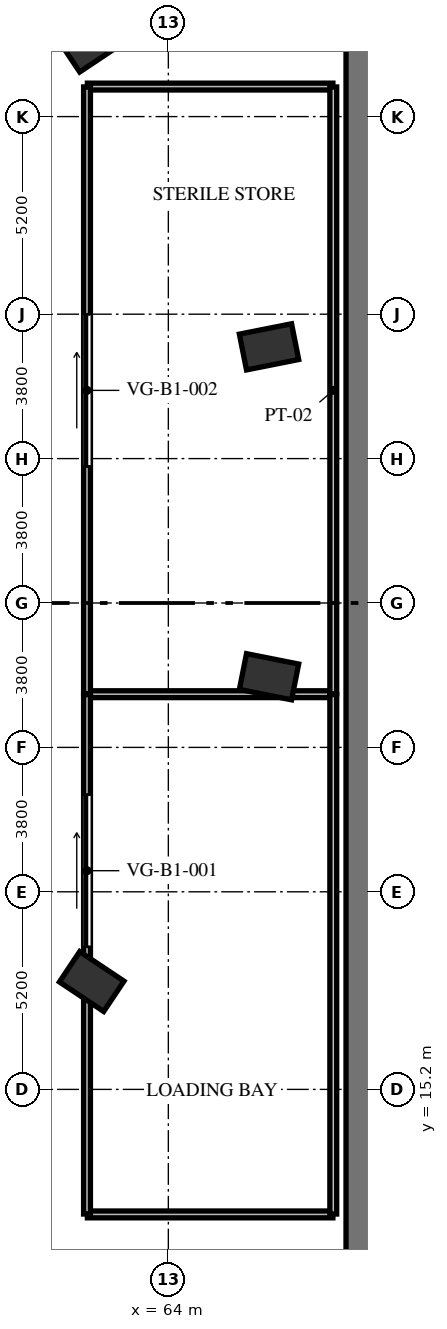
"""IFC4 building model, lengths in metres.
Left out: names, types, materials, properties, quantities, classifications, styles, units other than length and angle.
Written with IfcOpenShell. Run it as: python <this file> out.ifc"""

import sys

from ifc_helpers import new_model, si_unit, direction, frame, frame_2d, origin, origin_2d, place, context, subcontext, project, spatial, rectangle, extrude, element, fill, save


model = new_model("IFC4")
c1 = context("Model", 3, precision=1e-05, world=origin(), true_north=direction((0.0, 1.0)))
c2 = subcontext(c1, "Body", "Model", "MODEL_VIEW")
j1 = project(units=[si_unit("LENGTHUNIT", "METRE"), si_unit("PLANEANGLEUNIT", "RADIAN")], contexts=[c1])
p1 = place(None, origin())
s1 = spatial("IfcSite", under=j1, at=p1, CompositionType="ELEMENT")
p2 = place(p1, origin())
s2 = spatial("IfcBuilding", under=s1, at=p2, CompositionType="ELEMENT")
p3 = place(p2, frame((0.0, 0.0, -5.4)))
s3 = spatial("IfcBuildingStorey", under=s2, at=p3, CompositionType="ELEMENT", Elevation=-5.4)
for number, where, z_axis, x_axis in (
    (1, (61.983, 18.039, 0.0), (0.0, 0.0, 1.0), (0.831, -0.556, 0.0)),
    (2, (66.649, 26.059, 0.0), (0.0, 0.0, 1.0), (0.981, -0.195, 0.0)),
    (3, (66.649, 34.741, 0.0), (0.0, 0.0, 1.0), (0.981, 0.195, 0.0)),
    (4, (61.983, 42.761, 0.0), (0.0, 0.0, 1.0), (0.831, 0.556, 0.0)),
):
    element("IfcColumn", number, at=place(p3, frame(where, z_axis=z_axis, x_axis=x_axis)), inside=s3, PredefinedType="COLUMN", context=c2, shape_type="SweptSolid", body=[
        extrude(rectangle(XDim=1.4, YDim=0.96, at=origin_2d()), origin(), (0.0, 0.0, 1.0), 5.4),
    ])
p4 = place(p3, frame((69.0, 4.25, 0.0), z_axis=(0.0, 0.0, 1.0), x_axis=(0.0, 1.0, 0.0)))
e5 = element("IfcWall", 5, at=p4, inside=s3, PredefinedType="SHEAR", context=c2, shape_type="SweptSolid", body=[
    extrude(rectangle(XDim=47.5, YDim=0.65, at=frame_2d((23.75, 0.0))), origin(), (0.0, 0.0, 1.0), 5.4),
])
for number, where, z_axis, x_axis in (
    (6, (61.87, 25.6, 0.0), (0.0, 0.0, 1.0), (1.0, 0.0, 0.0)),
    (7, (61.87, 11.91, 0.0), (0.0, 0.0, 1.0), (1.0, 0.0, 0.0)),
):
    element("IfcWall", number, at=place(p3, frame(where, z_axis=z_axis, x_axis=x_axis)), inside=s3, PredefinedType="PARTITIONING", context=c2, shape_type="SweptSolid", body=[
        extrude(rectangle(XDim=6.46, YDim=0.18, at=frame_2d((3.23, 0.0))), origin(), (0.0, 0.0, 1.0), 5.12),
    ])
p5 = place(p3, frame((68.34, 11.92, 0.0), z_axis=(0.0, 0.0, 1.0), x_axis=(0.0, 1.0, 0.0)))
e8 = element("IfcWall", 8, at=p5, inside=s3, PredefinedType="PARTITIONING", context=c2, shape_type="SweptSolid", body=[
    extrude(rectangle(XDim=13.67, YDim=0.18, at=frame_2d((6.835, 0.0))), origin(), (0.0, 0.0, 1.0), 5.12),
])
p6 = place(p3, frame((61.86, 11.92, 0.0), z_axis=(0.0, 0.0, 1.0), x_axis=(0.0, 1.0, 0.0)))
e9 = element("IfcWall", 9, at=p6, inside=s3, PredefinedType="PARTITIONING", context=c2, shape_type="SweptSolid", body=[
    extrude(rectangle(XDim=13.67, YDim=0.18, at=frame_2d((6.835, 0.0))), origin(), (0.0, 0.0, 1.0), 5.12),
])
p7 = place(p6, frame((7.035, 0.0, 0.0)))
e10 = element("IfcOpeningElement", 10, at=p7, cuts=e9, PredefinedType="OPENING", context=c2, shape_type="SweptSolid", body=[
    extrude(rectangle(XDim=4.0, YDim=3.6, at=frame_2d((2.0, 1.8))), frame((0.0, 0.1, 0.0), z_axis=(0.0, -1.0, 0.0), x_axis=(1.0, 0.0, 0.0)), (0.0, 0.0, 1.0), 0.2),
])
p8 = place(p3, frame((61.87, 41.59, 0.0), z_axis=(0.0, 0.0, 1.0), x_axis=(1.0, 0.0, 0.0)))
e11 = element("IfcWall", 11, at=p8, inside=s3, PredefinedType="PARTITIONING", context=c2, shape_type="SweptSolid", body=[
    extrude(rectangle(XDim=6.46, YDim=0.18, at=frame_2d((3.23, 0.0))), origin(), (0.0, 0.0, 1.0), 5.12),
])
p9 = place(p3, frame((68.34, 25.61, 0.0), z_axis=(0.0, 0.0, 1.0), x_axis=(0.0, 1.0, 0.0)))
e12 = element("IfcWall", 12, at=p9, inside=s3, PredefinedType="PARTITIONING", context=c2, shape_type="SweptSolid", body=[
    extrude(rectangle(XDim=15.97, YDim=0.18, at=frame_2d((7.985, 0.0))), origin(), (0.0, 0.0, 1.0), 5.12),
])
p10 = place(p3, frame((61.86, 25.61, 0.0), z_axis=(0.0, 0.0, 1.0), x_axis=(0.0, 1.0, 0.0)))
e13 = element("IfcWall", 13, at=p10, inside=s3, PredefinedType="PARTITIONING", context=c2, shape_type="SweptSolid", body=[
    extrude(rectangle(XDim=15.97, YDim=0.18, at=frame_2d((7.985, 0.0))), origin(), (0.0, 0.0, 1.0), 5.12),
])
p11 = place(p10, frame((5.985, 0.0, 0.0)))
e14 = element("IfcOpeningElement", 14, at=p11, cuts=e13, PredefinedType="OPENING", context=c2, shape_type="SweptSolid", body=[
    extrude(rectangle(XDim=4.0, YDim=3.6, at=frame_2d((2.0, 1.8))), frame((0.0, 0.1, 0.0), z_axis=(0.0, -1.0, 0.0), x_axis=(1.0, 0.0, 0.0)), (0.0, 0.0, 1.0), 0.2),
])
p12 = place(p7, origin())
e15 = element("IfcDoor", 15, at=p12, inside=s3, OperationType="ROLLINGUP", PredefinedType="GATE", context=c2, shape_type="SweptSolid", body=[
    extrude(rectangle(XDim=4.0, YDim=3.6, at=frame_2d((2.0, 1.8))), frame((0.0, 0.025, 0.0), z_axis=(0.0, -1.0, 0.0), x_axis=(1.0, 0.0, 0.0)), (0.0, 0.0, 1.0), 0.05),
])
fill(e10, e15)
p13 = place(p11, origin())
e16 = element("IfcDoor", 16, at=p13, inside=s3, OperationType="ROLLINGUP", PredefinedType="GATE", context=c2, shape_type="SweptSolid", body=[
    extrude(rectangle(XDim=4.0, YDim=3.6, at=frame_2d((2.0, 1.8))), frame((0.0, 0.025, 0.0), z_axis=(0.0, -1.0, 0.0), x_axis=(1.0, 0.0, 0.0)), (0.0, 0.0, 1.0), 0.05),
])
fill(e14, e16)
save(model, sys.argv[1])
